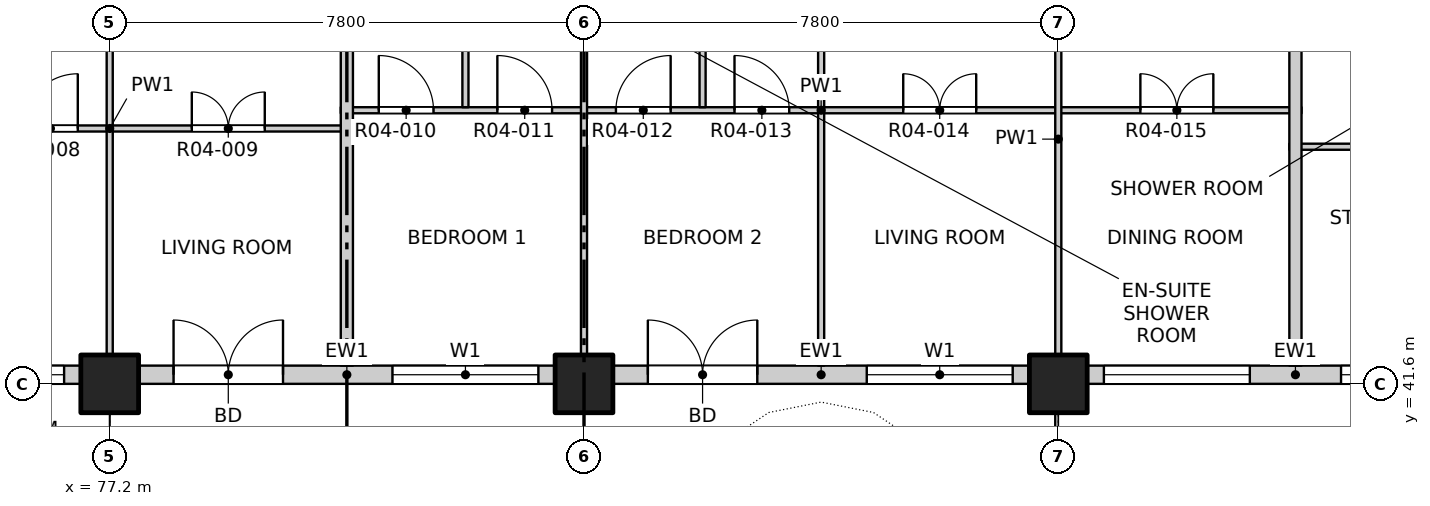
"""IFC4 building model, lengths in metres.
Left out: names, types, materials, properties, quantities, classifications, styles, units other than length and angle.
Written with IfcOpenShell. Run it as: python <this file> out.ifc"""

import sys

from ifc_helpers import new_model, si_unit, direction, frame, frame_2d, origin, origin_2d, place, context, subcontext, project, spatial, rectangle, extrude, element, fill, save


model = new_model("IFC4")
c1 = context("Model", 3, precision=1e-05, world=origin(), true_north=direction((0.0, 1.0)))
c2 = subcontext(c1, "Body", "Model", "MODEL_VIEW")
j1 = project(units=[si_unit("LENGTHUNIT", "METRE"), si_unit("PLANEANGLEUNIT", "RADIAN")], contexts=[c1])
p1 = place(None, origin())
s1 = spatial("IfcSite", under=j1, at=p1, CompositionType="ELEMENT")
p2 = place(p1, origin())
s2 = spatial("IfcBuilding", under=s1, at=p2, CompositionType="ELEMENT")
p3 = place(p2, frame((0.0, 0.0, 58.0)))
s3 = spatial("IfcBuildingStorey", under=s2, at=p3, CompositionType="ELEMENT", Elevation=58.0)
for number, where, z_axis, x_axis in (
    (1, (77.2, 41.6, -0.25), (0.0, 0.0, 1.0), (1.0, 0.0, 0.0)),
    (2, (85.0, 41.6, -0.25), (0.0, 0.0, 1.0), (1.0, 0.0, 0.0)),
    (3, (92.8, 41.6, -0.25), (0.0, 0.0, 1.0), (1.0, 0.0, 0.0)),
):
    element("IfcColumn", number, at=place(p3, frame(where, z_axis=z_axis, x_axis=x_axis)), inside=s3, PredefinedType="COLUMN", context=c2, shape_type="SweptSolid", body=[
        extrude(rectangle(XDim=0.95, YDim=0.95, at=origin_2d()), origin(), (0.0, 0.0, 1.0), 3.4),
    ])
p4 = place(p3, frame((69.875, 41.75, 0.0), z_axis=(0.0, 0.0, 1.0), x_axis=(1.0, 0.0, 0.0)))
e4 = element("IfcWall", 4, at=p4, inside=s3, PredefinedType="SOLIDWALL", context=c2, shape_type="SweptSolid", body=[
    extrude(rectangle(XDim=6.85, YDim=0.3, at=frame_2d((3.425, 0.0))), origin(), (0.0, 0.0, 1.0), 2.7),
])
p5 = place(p4, frame((0.575, 0.0, 0.0)))
e5 = element("IfcOpeningElement", 5, at=p5, cuts=e4, PredefinedType="OPENING", context=c2, shape_type="SweptSolid", body=[
    extrude(rectangle(XDim=1.8, YDim=2.4, at=frame_2d((0.9, 1.2))), frame((0.0, 0.16, 0.0), z_axis=(0.0, -1.0, 0.0), x_axis=(1.0, 0.0, 0.0)), (0.0, 0.0, 1.0), 0.32),
])
p6 = place(p4, frame((4.175, 0.0, 0.9)))
e6 = element("IfcOpeningElement", 6, at=p6, cuts=e4, PredefinedType="OPENING", context=c2, shape_type="SweptSolid", body=[
    extrude(rectangle(XDim=2.4, YDim=1.8, at=frame_2d((1.2, 0.9))), frame((0.0, 0.16, 0.0), z_axis=(0.0, -1.0, 0.0), x_axis=(1.0, 0.0, 0.0)), (0.0, 0.0, 1.0), 0.32),
])
p7 = place(p3, frame((77.675, 41.75, 0.0), z_axis=(0.0, 0.0, 1.0), x_axis=(1.0, 0.0, 0.0)))
e7 = element("IfcWall", 7, at=p7, inside=s3, PredefinedType="SOLIDWALL", context=c2, shape_type="SweptSolid", body=[
    extrude(rectangle(XDim=6.85, YDim=0.3, at=frame_2d((3.425, 0.0))), origin(), (0.0, 0.0, 1.0), 2.7),
])
p8 = place(p7, frame((0.575, 0.0, 0.0)))
e8 = element("IfcOpeningElement", 8, at=p8, cuts=e7, PredefinedType="OPENING", context=c2, shape_type="SweptSolid", body=[
    extrude(rectangle(XDim=1.8, YDim=2.4, at=frame_2d((0.9, 1.2))), frame((0.0, 0.16, 0.0), z_axis=(0.0, -1.0, 0.0), x_axis=(1.0, 0.0, 0.0)), (0.0, 0.0, 1.0), 0.32),
])
p9 = place(p7, frame((4.175, 0.0, 0.9)))
e9 = element("IfcOpeningElement", 9, at=p9, cuts=e7, PredefinedType="OPENING", context=c2, shape_type="SweptSolid", body=[
    extrude(rectangle(XDim=2.4, YDim=1.8, at=frame_2d((1.2, 0.9))), frame((0.0, 0.16, 0.0), z_axis=(0.0, -1.0, 0.0), x_axis=(1.0, 0.0, 0.0)), (0.0, 0.0, 1.0), 0.32),
])
p10 = place(p3, frame((85.475, 41.75, 0.0), z_axis=(0.0, 0.0, 1.0), x_axis=(1.0, 0.0, 0.0)))
e10 = element("IfcWall", 10, at=p10, inside=s3, PredefinedType="SOLIDWALL", context=c2, shape_type="SweptSolid", body=[
    extrude(rectangle(XDim=6.85, YDim=0.3, at=frame_2d((3.425, 0.0))), origin(), (0.0, 0.0, 1.0), 2.7),
])
p11 = place(p10, frame((0.575, 0.0, 0.0)))
e11 = element("IfcOpeningElement", 11, at=p11, cuts=e10, PredefinedType="OPENING", context=c2, shape_type="SweptSolid", body=[
    extrude(rectangle(XDim=1.8, YDim=2.4, at=frame_2d((0.9, 1.2))), frame((0.0, 0.16, 0.0), z_axis=(0.0, -1.0, 0.0), x_axis=(1.0, 0.0, 0.0)), (0.0, 0.0, 1.0), 0.32),
])
p12 = place(p10, frame((4.175, 0.0, 0.9)))
e12 = element("IfcOpeningElement", 12, at=p12, cuts=e10, PredefinedType="OPENING", context=c2, shape_type="SweptSolid", body=[
    extrude(rectangle(XDim=2.4, YDim=1.8, at=frame_2d((1.2, 0.9))), frame((0.0, 0.16, 0.0), z_axis=(0.0, -1.0, 0.0), x_axis=(1.0, 0.0, 0.0)), (0.0, 0.0, 1.0), 0.32),
])
p13 = place(p3, frame((93.275, 41.75, 0.0), z_axis=(0.0, 0.0, 1.0), x_axis=(1.0, 0.0, 0.0)))
e13 = element("IfcWall", 13, at=p13, inside=s3, PredefinedType="SOLIDWALL", context=c2, shape_type="SweptSolid", body=[
    extrude(rectangle(XDim=6.85, YDim=0.3, at=frame_2d((3.425, 0.0))), origin(), (0.0, 0.0, 1.0), 2.7),
])
p14 = place(p13, frame((0.275, 0.0, 0.9)))
e14 = element("IfcOpeningElement", 14, at=p14, cuts=e13, PredefinedType="OPENING", context=c2, shape_type="SweptSolid", body=[
    extrude(rectangle(XDim=2.4, YDim=1.8, at=frame_2d((1.2, 0.9))), frame((0.0, 0.16, 0.0), z_axis=(0.0, -1.0, 0.0), x_axis=(1.0, 0.0, 0.0)), (0.0, 0.0, 1.0), 0.32),
])
p15 = place(p13, frame((4.175, 0.0, 0.9)))
e15 = element("IfcOpeningElement", 15, at=p15, cuts=e13, PredefinedType="OPENING", context=c2, shape_type="SweptSolid", body=[
    extrude(rectangle(XDim=2.4, YDim=1.8, at=frame_2d((1.2, 0.9))), frame((0.0, 0.16, 0.0), z_axis=(0.0, -1.0, 0.0), x_axis=(1.0, 0.0, 0.0)), (0.0, 0.0, 1.0), 0.32),
])
p16 = place(p3, frame((96.6, 45.5, 0.0), z_axis=(0.0, 0.0, 1.0), x_axis=(1.0, 0.0, 0.0)))
e16 = element("IfcWall", 16, at=p16, inside=s3, PredefinedType="PARTITIONING", context=c2, shape_type="SweptSolid", body=[
    extrude(rectangle(XDim=11.5, YDim=0.1, at=frame_2d((5.75, 0.0))), origin(), (0.0, 0.0, 1.0), 3.15),
])
p17 = place(p16, frame((2.635, 0.0, 0.0)))
e17 = element("IfcOpeningElement", 17, at=p17, cuts=e16, PredefinedType="OPENING", context=c2, shape_type="SweptSolid", body=[
    extrude(rectangle(XDim=0.9, YDim=2.1, at=frame_2d((0.45, 1.05))), frame((0.0, 0.06, 0.0), z_axis=(0.0, -1.0, 0.0), x_axis=(1.0, 0.0, 0.0)), (0.0, 0.0, 1.0), 0.12),
])
p18 = place(p3, frame((73.2, 45.8, 0.0), z_axis=(0.0, 0.0, 1.0), x_axis=(1.0, 0.0, 0.0)))
e18 = element("IfcWall", 18, at=p18, inside=s3, PredefinedType="PARTITIONING", context=c2, shape_type="SweptSolid", body=[
    extrude(rectangle(XDim=8.0, YDim=0.1, at=frame_2d((4.0, 0.0))), origin(), (0.0, 0.0, 1.0), 3.15),
])
p19 = place(p18, frame((0.625, 0.0, 0.0)))
e19 = element("IfcOpeningElement", 19, at=p19, cuts=e18, PredefinedType="OPENING", context=c2, shape_type="SweptSolid", body=[
    extrude(rectangle(XDim=0.9, YDim=2.1, at=frame_2d((0.45, 1.05))), frame((0.0, 0.06, 0.0), z_axis=(0.0, -1.0, 0.0), x_axis=(1.0, 0.0, 0.0)), (0.0, 0.0, 1.0), 0.12),
])
p20 = place(p18, frame((2.575, 0.0, 0.0)))
e20 = element("IfcOpeningElement", 20, at=p20, cuts=e18, PredefinedType="OPENING", context=c2, shape_type="SweptSolid", body=[
    extrude(rectangle(XDim=0.9, YDim=2.1, at=frame_2d((0.45, 1.05))), frame((0.0, 0.06, 0.0), z_axis=(0.0, -1.0, 0.0), x_axis=(1.0, 0.0, 0.0)), (0.0, 0.0, 1.0), 0.12),
])
p21 = place(p18, frame((5.35, 0.0, 0.0)))
e21 = element("IfcOpeningElement", 21, at=p21, cuts=e18, PredefinedType="OPENING", context=c2, shape_type="SweptSolid", body=[
    extrude(rectangle(XDim=1.2, YDim=2.1, at=frame_2d((0.6, 1.05))), frame((0.0, 0.06, 0.0), z_axis=(0.0, -1.0, 0.0), x_axis=(1.0, 0.0, 0.0)), (0.0, 0.0, 1.0), 0.12),
])
p22 = place(p3, frame((81.0, 46.1, 0.0), z_axis=(0.0, 0.0, 1.0), x_axis=(1.0, 0.0, 0.0)))
e22 = element("IfcWall", 22, at=p22, inside=s3, PredefinedType="PARTITIONING", context=c2, shape_type="SweptSolid", body=[
    extrude(rectangle(XDim=15.8, YDim=0.1, at=frame_2d((7.9, 0.0))), origin(), (0.0, 0.0, 1.0), 3.15),
])
p23 = place(p22, frame((0.625, 0.0, 0.0)))
e23 = element("IfcOpeningElement", 23, at=p23, cuts=e22, PredefinedType="OPENING", context=c2, shape_type="SweptSolid", body=[
    extrude(rectangle(XDim=0.9, YDim=2.1, at=frame_2d((0.45, 1.05))), frame((0.0, 0.06, 0.0), z_axis=(0.0, -1.0, 0.0), x_axis=(1.0, 0.0, 0.0)), (0.0, 0.0, 1.0), 0.12),
])
p24 = place(p22, frame((2.575, 0.0, 0.0)))
e24 = element("IfcOpeningElement", 24, at=p24, cuts=e22, PredefinedType="OPENING", context=c2, shape_type="SweptSolid", body=[
    extrude(rectangle(XDim=0.9, YDim=2.1, at=frame_2d((0.45, 1.05))), frame((0.0, 0.06, 0.0), z_axis=(0.0, -1.0, 0.0), x_axis=(1.0, 0.0, 0.0)), (0.0, 0.0, 1.0), 0.12),
])
p25 = place(p22, frame((4.525, 0.0, 0.0)))
e25 = element("IfcOpeningElement", 25, at=p25, cuts=e22, PredefinedType="OPENING", context=c2, shape_type="SweptSolid", body=[
    extrude(rectangle(XDim=0.9, YDim=2.1, at=frame_2d((0.45, 1.05))), frame((0.0, 0.06, 0.0), z_axis=(0.0, -1.0, 0.0), x_axis=(1.0, 0.0, 0.0)), (0.0, 0.0, 1.0), 0.12),
])
p26 = place(p22, frame((6.475, 0.0, 0.0)))
e26 = element("IfcOpeningElement", 26, at=p26, cuts=e22, PredefinedType="OPENING", context=c2, shape_type="SweptSolid", body=[
    extrude(rectangle(XDim=0.9, YDim=2.1, at=frame_2d((0.45, 1.05))), frame((0.0, 0.06, 0.0), z_axis=(0.0, -1.0, 0.0), x_axis=(1.0, 0.0, 0.0)), (0.0, 0.0, 1.0), 0.12),
])
p27 = place(p22, frame((9.25, 0.0, 0.0)))
e27 = element("IfcOpeningElement", 27, at=p27, cuts=e22, PredefinedType="OPENING", context=c2, shape_type="SweptSolid", body=[
    extrude(rectangle(XDim=1.2, YDim=2.1, at=frame_2d((0.6, 1.05))), frame((0.0, 0.06, 0.0), z_axis=(0.0, -1.0, 0.0), x_axis=(1.0, 0.0, 0.0)), (0.0, 0.0, 1.0), 0.12),
])
p28 = place(p22, frame((13.15, 0.0, 0.0)))
e28 = element("IfcOpeningElement", 28, at=p28, cuts=e22, PredefinedType="OPENING", context=c2, shape_type="SweptSolid", body=[
    extrude(rectangle(XDim=1.2, YDim=2.1, at=frame_2d((0.6, 1.05))), frame((0.0, 0.06, 0.0), z_axis=(0.0, -1.0, 0.0), x_axis=(1.0, 0.0, 0.0)), (0.0, 0.0, 1.0), 0.12),
])
p29 = place(p3, frame((77.2, 41.9, 0.0), z_axis=(0.0, 0.0, 1.0), x_axis=(0.0, 1.0, 0.0)))
e29 = element("IfcWall", 29, at=p29, inside=s3, PredefinedType="PARTITIONING", context=c2, shape_type="SweptSolid", body=[
    extrude(rectangle(XDim=7.45, YDim=0.1, at=frame_2d((3.725, 0.0))), origin(), (0.0, 0.0, 1.0), 2.55),
])
p30 = place(p3, frame((81.1, 41.9, 0.0), z_axis=(0.0, 0.0, 1.0), x_axis=(0.0, 1.0, 0.0)))
e30 = element("IfcWall", 30, at=p30, inside=s3, PredefinedType="PARTITIONING", context=c2, shape_type="SweptSolid", body=[
    extrude(rectangle(XDim=11.3, YDim=0.2, at=frame_2d((5.65, 0.0))), origin(), (0.0, 0.0, 1.0), 3.15),
])
p31 = place(p3, frame((83.05, 46.15, 0.0), z_axis=(0.0, 0.0, 1.0), x_axis=(0.0, 1.0, 0.0)))
e31 = element("IfcWall", 31, at=p31, inside=s3, PredefinedType="PARTITIONING", context=c2, shape_type="SweptSolid", body=[
    extrude(rectangle(XDim=3.2, YDim=0.1, at=frame_2d((1.6, 0.0))), origin(), (0.0, 0.0, 1.0), 3.15),
])
p32 = place(p3, frame((85.0, 41.9, 0.0), z_axis=(0.0, 0.0, 1.0), x_axis=(0.0, 1.0, 0.0)))
e32 = element("IfcWall", 32, at=p32, inside=s3, PredefinedType="PARTITIONING", context=c2, shape_type="SweptSolid", body=[
    extrude(rectangle(XDim=7.45, YDim=0.1, at=frame_2d((3.725, 0.0))), origin(), (0.0, 0.0, 1.0), 2.55),
])
p33 = place(p3, frame((86.95, 46.15, 0.0), z_axis=(0.0, 0.0, 1.0), x_axis=(0.0, 1.0, 0.0)))
e33 = element("IfcWall", 33, at=p33, inside=s3, PredefinedType="PARTITIONING", context=c2, shape_type="SweptSolid", body=[
    extrude(rectangle(XDim=3.2, YDim=0.1, at=frame_2d((1.6, 0.0))), origin(), (0.0, 0.0, 1.0), 3.15),
])
p34 = place(p3, frame((88.9, 41.9, 0.0), z_axis=(0.0, 0.0, 1.0), x_axis=(0.0, 1.0, 0.0)))
e34 = element("IfcWall", 34, at=p34, inside=s3, PredefinedType="PARTITIONING", context=c2, shape_type="SweptSolid", body=[
    extrude(rectangle(XDim=7.45, YDim=0.1, at=frame_2d((3.725, 0.0))), origin(), (0.0, 0.0, 1.0), 3.15),
])
p35 = place(p3, frame((92.8, 41.9, 0.0), z_axis=(0.0, 0.0, 1.0), x_axis=(0.0, 1.0, 0.0)))
e35 = element("IfcWall", 35, at=p35, inside=s3, PredefinedType="PARTITIONING", context=c2, shape_type="SweptSolid", body=[
    extrude(rectangle(XDim=7.45, YDim=0.1, at=frame_2d((3.725, 0.0))), origin(), (0.0, 0.0, 1.0), 2.55),
])
p36 = place(p3, frame((96.7, 41.9, 0.0), z_axis=(0.0, 0.0, 1.0), x_axis=(0.0, 1.0, 0.0)))
e36 = element("IfcWall", 36, at=p36, inside=s3, PredefinedType="PARTITIONING", context=c2, shape_type="SweptSolid", body=[
    extrude(rectangle(XDim=11.3, YDim=0.2, at=frame_2d((5.65, 0.0))), origin(), (0.0, 0.0, 1.0), 3.15),
])
p37 = place(p6, origin())
e37 = element("IfcWindow", 37, at=p37, inside=s3, PartitioningType="DOUBLE_PANEL_VERTICAL", PredefinedType="WINDOW", context=c2, shape_type="SweptSolid", body=[
    extrude(rectangle(XDim=2.4, YDim=1.8, at=frame_2d((1.2, 0.9))), frame((0.0, 0.03, 0.0), z_axis=(0.0, -1.0, 0.0), x_axis=(1.0, 0.0, 0.0)), (0.0, 0.0, 1.0), 0.06),
])
fill(e6, e37)
p38 = place(p8, origin())
e38 = element("IfcDoor", 38, at=p38, inside=s3, OperationType="DOUBLE_DOOR_SINGLE_SWING", PredefinedType="DOOR", context=c2, shape_type="SweptSolid", body=[
    extrude(rectangle(XDim=1.8, YDim=2.4, at=frame_2d((0.9, 1.2))), frame((0.0, 0.025, 0.0), z_axis=(0.0, -1.0, 0.0), x_axis=(1.0, 0.0, 0.0)), (0.0, 0.0, 1.0), 0.05),
])
fill(e8, e38)
p39 = place(p9, origin())
e39 = element("IfcWindow", 39, at=p39, inside=s3, PartitioningType="DOUBLE_PANEL_VERTICAL", PredefinedType="WINDOW", context=c2, shape_type="SweptSolid", body=[
    extrude(rectangle(XDim=2.4, YDim=1.8, at=frame_2d((1.2, 0.9))), frame((0.0, 0.03, 0.0), z_axis=(0.0, -1.0, 0.0), x_axis=(1.0, 0.0, 0.0)), (0.0, 0.0, 1.0), 0.06),
])
fill(e9, e39)
p40 = place(p11, origin())
e40 = element("IfcDoor", 40, at=p40, inside=s3, OperationType="DOUBLE_DOOR_SINGLE_SWING", PredefinedType="DOOR", context=c2, shape_type="SweptSolid", body=[
    extrude(rectangle(XDim=1.8, YDim=2.4, at=frame_2d((0.9, 1.2))), frame((0.0, 0.025, 0.0), z_axis=(0.0, -1.0, 0.0), x_axis=(1.0, 0.0, 0.0)), (0.0, 0.0, 1.0), 0.05),
])
fill(e11, e40)
p41 = place(p12, origin())
e41 = element("IfcWindow", 41, at=p41, inside=s3, PartitioningType="DOUBLE_PANEL_VERTICAL", PredefinedType="WINDOW", context=c2, shape_type="SweptSolid", body=[
    extrude(rectangle(XDim=2.4, YDim=1.8, at=frame_2d((1.2, 0.9))), frame((0.0, 0.03, 0.0), z_axis=(0.0, -1.0, 0.0), x_axis=(1.0, 0.0, 0.0)), (0.0, 0.0, 1.0), 0.06),
])
fill(e12, e41)
p42 = place(p14, origin())
e42 = element("IfcWindow", 42, at=p42, inside=s3, PartitioningType="DOUBLE_PANEL_VERTICAL", PredefinedType="WINDOW", context=c2, shape_type="SweptSolid", body=[
    extrude(rectangle(XDim=2.4, YDim=1.8, at=frame_2d((1.2, 0.9))), frame((0.0, 0.03, 0.0), z_axis=(0.0, -1.0, 0.0), x_axis=(1.0, 0.0, 0.0)), (0.0, 0.0, 1.0), 0.06),
])
fill(e14, e42)
p43 = place(p15, origin())
e43 = element("IfcWindow", 43, at=p43, inside=s3, PartitioningType="DOUBLE_PANEL_VERTICAL", PredefinedType="WINDOW", context=c2, shape_type="SweptSolid", body=[
    extrude(rectangle(XDim=2.4, YDim=1.8, at=frame_2d((1.2, 0.9))), frame((0.0, 0.03, 0.0), z_axis=(0.0, -1.0, 0.0), x_axis=(1.0, 0.0, 0.0)), (0.0, 0.0, 1.0), 0.06),
])
fill(e15, e43)
p44 = place(p20, origin())
e44 = element("IfcDoor", 44, at=p44, inside=s3, OperationType="SINGLE_SWING_RIGHT", PredefinedType="DOOR", context=c2, shape_type="SweptSolid", body=[
    extrude(rectangle(XDim=0.9, YDim=2.1, at=frame_2d((0.45, 1.05))), frame((0.0, 0.025, 0.0), z_axis=(0.0, -1.0, 0.0), x_axis=(1.0, 0.0, 0.0)), (0.0, 0.0, 1.0), 0.05),
])
fill(e20, e44)
p45 = place(p21, origin())
e45 = element("IfcDoor", 45, at=p45, inside=s3, OperationType="DOUBLE_DOOR_SINGLE_SWING", PredefinedType="DOOR", context=c2, shape_type="SweptSolid", body=[
    extrude(rectangle(XDim=1.2, YDim=2.1, at=frame_2d((0.6, 1.05))), frame((0.0, 0.025, 0.0), z_axis=(0.0, -1.0, 0.0), x_axis=(1.0, 0.0, 0.0)), (0.0, 0.0, 1.0), 0.05),
])
fill(e21, e45)
p46 = place(p23, origin())
e46 = element("IfcDoor", 46, at=p46, inside=s3, OperationType="SINGLE_SWING_LEFT", PredefinedType="DOOR", context=c2, shape_type="SweptSolid", body=[
    extrude(rectangle(XDim=0.9, YDim=2.1, at=frame_2d((0.45, 1.05))), frame((0.0, 0.025, 0.0), z_axis=(0.0, -1.0, 0.0), x_axis=(1.0, 0.0, 0.0)), (0.0, 0.0, 1.0), 0.05),
])
fill(e23, e46)
p47 = place(p24, origin())
e47 = element("IfcDoor", 47, at=p47, inside=s3, OperationType="SINGLE_SWING_LEFT", PredefinedType="DOOR", context=c2, shape_type="SweptSolid", body=[
    extrude(rectangle(XDim=0.9, YDim=2.1, at=frame_2d((0.45, 1.05))), frame((0.0, 0.025, 0.0), z_axis=(0.0, -1.0, 0.0), x_axis=(1.0, 0.0, 0.0)), (0.0, 0.0, 1.0), 0.05),
])
fill(e24, e47)
p48 = place(p25, origin())
e48 = element("IfcDoor", 48, at=p48, inside=s3, OperationType="SINGLE_SWING_RIGHT", PredefinedType="DOOR", context=c2, shape_type="SweptSolid", body=[
    extrude(rectangle(XDim=0.9, YDim=2.1, at=frame_2d((0.45, 1.05))), frame((0.0, 0.025, 0.0), z_axis=(0.0, -1.0, 0.0), x_axis=(1.0, 0.0, 0.0)), (0.0, 0.0, 1.0), 0.05),
])
fill(e25, e48)
p49 = place(p26, origin())
e49 = element("IfcDoor", 49, at=p49, inside=s3, OperationType="SINGLE_SWING_LEFT", PredefinedType="DOOR", context=c2, shape_type="SweptSolid", body=[
    extrude(rectangle(XDim=0.9, YDim=2.1, at=frame_2d((0.45, 1.05))), frame((0.0, 0.025, 0.0), z_axis=(0.0, -1.0, 0.0), x_axis=(1.0, 0.0, 0.0)), (0.0, 0.0, 1.0), 0.05),
])
fill(e26, e49)
p50 = place(p27, origin())
e50 = element("IfcDoor", 50, at=p50, inside=s3, OperationType="DOUBLE_DOOR_SINGLE_SWING", PredefinedType="DOOR", context=c2, shape_type="SweptSolid", body=[
    extrude(rectangle(XDim=1.2, YDim=2.1, at=frame_2d((0.6, 1.05))), frame((0.0, 0.025, 0.0), z_axis=(0.0, -1.0, 0.0), x_axis=(1.0, 0.0, 0.0)), (0.0, 0.0, 1.0), 0.05),
])
fill(e27, e50)
p51 = place(p28, origin())
e51 = element("IfcDoor", 51, at=p51, inside=s3, OperationType="DOUBLE_DOOR_SINGLE_SWING", PredefinedType="DOOR", context=c2, shape_type="SweptSolid", body=[
    extrude(rectangle(XDim=1.2, YDim=2.1, at=frame_2d((0.6, 1.05))), frame((0.0, 0.025, 0.0), z_axis=(0.0, -1.0, 0.0), x_axis=(1.0, 0.0, 0.0)), (0.0, 0.0, 1.0), 0.05),
])
fill(e28, e51)
save(model, sys.argv[1])
